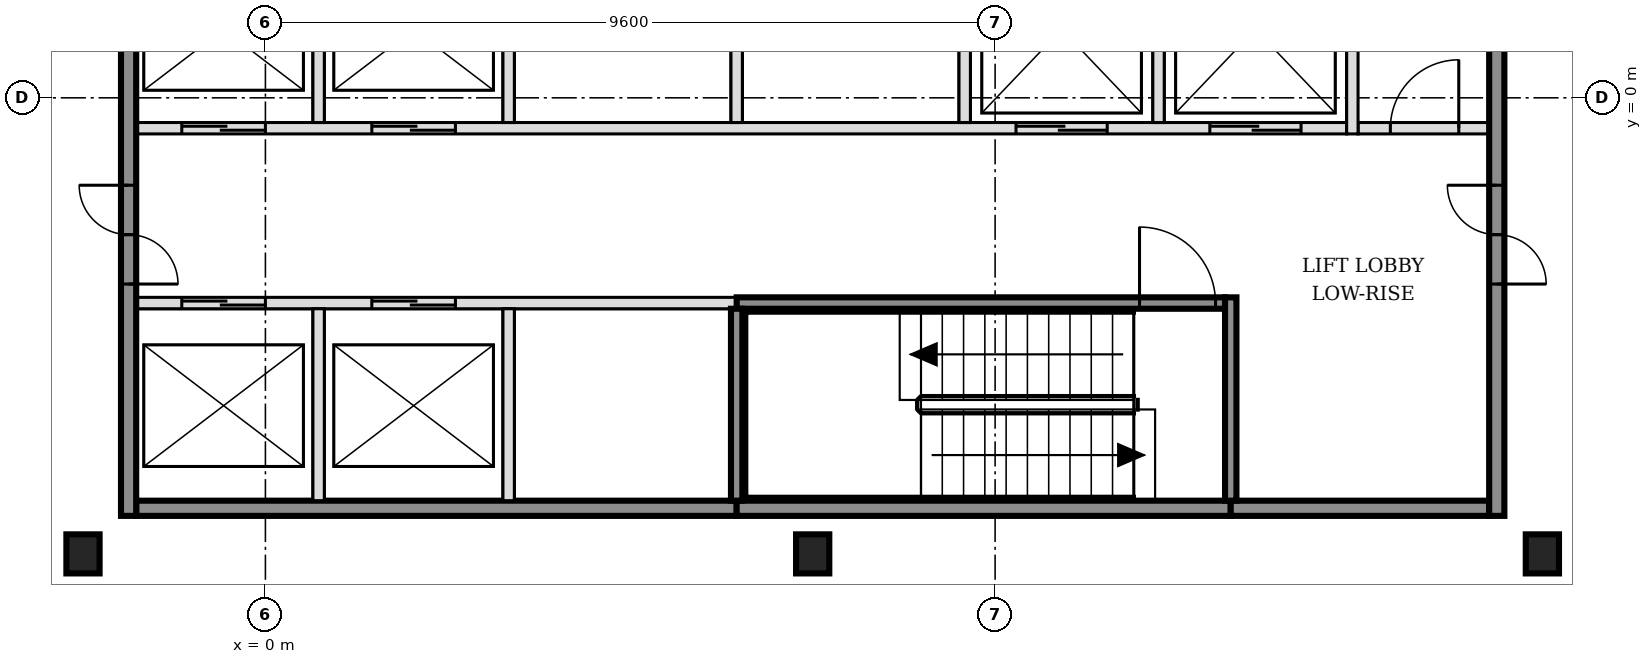
"""IFC4 building model, lengths in metres.
Left out: names, types, materials, properties, quantities, classifications, styles, units other than length and angle.
Written with IfcOpenShell. Run it as: python <this file> out.ifc"""

import sys

from ifc_helpers import new_model, si_unit, direction, frame, frame_2d, origin, origin_2d, place, context, subcontext, project, spatial, rectangle, i_section, extrude, element, fill, save


model = new_model("IFC4")
c1 = context("Model", 3, precision=1e-05, world=origin(), true_north=direction((0.0, 1.0)))
c2 = subcontext(c1, "Body", "Model", "MODEL_VIEW")
j1 = project(units=[si_unit("LENGTHUNIT", "METRE"), si_unit("PLANEANGLEUNIT", "RADIAN")], contexts=[c1])
p1 = place(None, origin())
s1 = spatial("IfcSite", under=j1, at=p1, CompositionType="ELEMENT")
p2 = place(p1, origin())
s2 = spatial("IfcBuilding", under=s1, at=p2, CompositionType="ELEMENT")
p3 = place(p2, frame((0.0, 0.0, 72.6)))
s3 = spatial("IfcBuildingStorey", under=s2, at=p3, CompositionType="ELEMENT", Elevation=72.6)
for number, where, z_axis, x_axis in (
    (1, (-2.4, -6.0, -0.15), (0.0, 0.0, 1.0), (1.0, 0.0, 0.0)),
    (2, (7.2, -6.0, -0.15), (0.0, 0.0, 1.0), (1.0, 0.0, 0.0)),
    (3, (16.8, -6.0, -0.15), (0.0, 0.0, 1.0), (1.0, 0.0, 0.0)),
):
    element("IfcColumn", number, at=place(p3, frame(where, z_axis=z_axis, x_axis=x_axis)), inside=s3, PredefinedType="COLUMN", context=c2, shape_type="SweptSolid", body=[
        extrude(i_section(OverallWidth=0.437, OverallDepth=0.514, WebThickness=0.061, FlangeThickness=0.097, FilletRadius=0.015, at=origin_2d()), origin(), (0.0, 0.0, 1.0), 3.6),
    ])
p4 = place(p3, frame((-1.7, -5.4, 0.0), z_axis=(0.0, 0.0, 1.0), x_axis=(1.0, 0.0, 0.0)))
e4 = element("IfcWall", 4, at=p4, inside=s3, PredefinedType="SOLIDWALL", context=c2, shape_type="SweptSolid", body=[
    extrude(rectangle(XDim=7.9, YDim=0.2, at=frame_2d((3.95, 0.0))), origin(), (0.0, 0.0, 1.0), 3.45),
])
p5 = place(p3, frame((6.2, -5.4, 0.0), z_axis=(0.0, 0.0, 1.0), x_axis=(1.0, 0.0, 0.0)))
e5 = element("IfcWall", 5, at=p5, inside=s3, PredefinedType="SOLIDWALL", context=c2, shape_type="SweptSolid", body=[
    extrude(rectangle(XDim=6.5, YDim=0.2, at=frame_2d((3.25, 0.0))), origin(), (0.0, 0.0, 1.0), 3.45),
])
p6 = place(p3, frame((12.7, -5.4, 0.0), z_axis=(0.0, 0.0, 1.0), x_axis=(1.0, 0.0, 0.0)))
e6 = element("IfcWall", 6, at=p6, inside=s3, PredefinedType="SOLIDWALL", context=c2, shape_type="SweptSolid", body=[
    extrude(rectangle(XDim=3.4, YDim=0.2, at=frame_2d((1.7, 0.0))), origin(), (0.0, 0.0, 1.0), 3.45),
])
p7 = place(p3, frame((-1.7, -2.7, 0.0), z_axis=(0.0, 0.0, 1.0), x_axis=(1.0, 0.0, 0.0)))
e7 = element("IfcWall", 7, at=p7, inside=s3, PredefinedType="SOLIDWALL", context=c2, shape_type="SweptSolid", body=[
    extrude(rectangle(XDim=7.9, YDim=0.15, at=frame_2d((3.95, 0.0))), origin(), (0.0, 0.0, 1.0), 3.45),
])
p8 = place(p7, frame((0.6, 0.0, 0.0)))
e8 = element("IfcOpeningElement", 8, at=p8, cuts=e7, PredefinedType="OPENING", context=c2, shape_type="SweptSolid", body=[
    extrude(rectangle(XDim=1.1, YDim=2.1, at=frame_2d((0.55, 1.05))), frame((0.0, 0.085, 0.0), z_axis=(0.0, -1.0, 0.0), x_axis=(1.0, 0.0, 0.0)), (0.0, 0.0, 1.0), 0.17),
])
p9 = place(p7, frame((3.1, 0.0, 0.0)))
e9 = element("IfcOpeningElement", 9, at=p9, cuts=e7, PredefinedType="OPENING", context=c2, shape_type="SweptSolid", body=[
    extrude(rectangle(XDim=1.1, YDim=2.1, at=frame_2d((0.55, 1.05))), frame((0.0, 0.085, 0.0), z_axis=(0.0, -1.0, 0.0), x_axis=(1.0, 0.0, 0.0)), (0.0, 0.0, 1.0), 0.17),
])
p10 = place(p3, frame((6.2, -2.7, 0.0), z_axis=(0.0, 0.0, 1.0), x_axis=(1.0, 0.0, 0.0)))
e10 = element("IfcWall", 10, at=p10, inside=s3, PredefinedType="SOLIDWALL", context=c2, shape_type="SweptSolid", body=[
    extrude(rectangle(XDim=6.425, YDim=0.15, at=frame_2d((3.212, 0.0))), origin(), (0.0, 0.0, 1.0), 3.45),
])
p11 = place(p10, frame((5.3, 0.0, 0.0)))
e11 = element("IfcOpeningElement", 11, at=p11, cuts=e10, PredefinedType="OPENING", context=c2, shape_type="SweptSolid", body=[
    extrude(rectangle(XDim=1.0, YDim=2.1, at=frame_2d((0.5, 1.05))), frame((0.0, 0.085, 0.0), z_axis=(0.0, -1.0, 0.0), x_axis=(1.0, 0.0, 0.0)), (0.0, 0.0, 1.0), 0.17),
])
p12 = place(p3, frame((-1.7, -0.4, 0.0), z_axis=(0.0, 0.0, 1.0), x_axis=(1.0, 0.0, 0.0)))
e12 = element("IfcWall", 12, at=p12, inside=s3, PredefinedType="SOLIDWALL", context=c2, shape_type="SweptSolid", body=[
    extrude(rectangle(XDim=15.925, YDim=0.15, at=frame_2d((7.962, 0.0))), origin(), (0.0, 0.0, 1.0), 3.45),
])
p13 = place(p12, frame((0.6, 0.0, 0.0)))
e13 = element("IfcOpeningElement", 13, at=p13, cuts=e12, PredefinedType="OPENING", context=c2, shape_type="SweptSolid", body=[
    extrude(rectangle(XDim=1.1, YDim=2.1, at=frame_2d((0.55, 1.05))), frame((0.0, 0.085, 0.0), z_axis=(0.0, -1.0, 0.0), x_axis=(1.0, 0.0, 0.0)), (0.0, 0.0, 1.0), 0.17),
])
p14 = place(p12, frame((3.1, 0.0, 0.0)))
e14 = element("IfcOpeningElement", 14, at=p14, cuts=e12, PredefinedType="OPENING", context=c2, shape_type="SweptSolid", body=[
    extrude(rectangle(XDim=1.1, YDim=2.1, at=frame_2d((0.55, 1.05))), frame((0.0, 0.085, 0.0), z_axis=(0.0, -1.0, 0.0), x_axis=(1.0, 0.0, 0.0)), (0.0, 0.0, 1.0), 0.17),
])
p15 = place(p12, frame((11.575, 0.0, 0.0)))
e15 = element("IfcOpeningElement", 15, at=p15, cuts=e12, PredefinedType="OPENING", context=c2, shape_type="SweptSolid", body=[
    extrude(rectangle(XDim=1.2, YDim=2.1, at=frame_2d((0.6, 1.05))), frame((0.0, 0.085, 0.0), z_axis=(0.0, -1.0, 0.0), x_axis=(1.0, 0.0, 0.0)), (0.0, 0.0, 1.0), 0.17),
])
p16 = place(p12, frame((14.125, 0.0, 0.0)))
e16 = element("IfcOpeningElement", 16, at=p16, cuts=e12, PredefinedType="OPENING", context=c2, shape_type="SweptSolid", body=[
    extrude(rectangle(XDim=1.2, YDim=2.1, at=frame_2d((0.6, 1.05))), frame((0.0, 0.085, 0.0), z_axis=(0.0, -1.0, 0.0), x_axis=(1.0, 0.0, 0.0)), (0.0, 0.0, 1.0), 0.17),
])
p17 = place(p3, frame((14.375, -0.4, 0.0), z_axis=(0.0, 0.0, 1.0), x_axis=(1.0, 0.0, 0.0)))
e17 = element("IfcWall", 17, at=p17, inside=s3, PredefinedType="PARTITIONING", context=c2, shape_type="SweptSolid", body=[
    extrude(rectangle(XDim=1.725, YDim=0.15, at=frame_2d((0.863, 0.0))), origin(), (0.0, 0.0, 1.0), 3.45),
])
p18 = place(p17, frame((0.425, 0.0, 0.0)))
e18 = element("IfcOpeningElement", 18, at=p18, cuts=e17, PredefinedType="OPENING", context=c2, shape_type="SweptSolid", body=[
    extrude(rectangle(XDim=0.9, YDim=2.1, at=frame_2d((0.45, 1.05))), frame((0.0, 0.085, 0.0), z_axis=(0.0, -1.0, 0.0), x_axis=(1.0, 0.0, 0.0)), (0.0, 0.0, 1.0), 0.17),
])
p19 = place(p3, frame((-1.8, -5.5, 0.0), z_axis=(0.0, 0.0, 1.0), x_axis=(0.0, 1.0, 0.0)))
e19 = element("IfcWall", 19, at=p19, inside=s3, PredefinedType="SOLIDWALL", context=c2, shape_type="SweptSolid", body=[
    extrude(rectangle(XDim=15.8, YDim=0.2, at=frame_2d((7.9, 0.0))), origin(), (0.0, 0.0, 1.0), 3.45),
])
p20 = place(p19, frame((3.05, 0.0, 0.0)))
e20 = element("IfcOpeningElement", 20, at=p20, cuts=e19, PredefinedType="OPENING", context=c2, shape_type="SweptSolid", body=[
    extrude(rectangle(XDim=1.3, YDim=2.1, at=frame_2d((0.65, 1.05))), frame((0.0, 0.11, 0.0), z_axis=(0.0, -1.0, 0.0), x_axis=(1.0, 0.0, 0.0)), (0.0, 0.0, 1.0), 0.22),
])
p21 = place(p19, frame((11.45, 0.0, 0.0)))
e21 = element("IfcOpeningElement", 21, at=p21, cuts=e19, PredefinedType="OPENING", context=c2, shape_type="SweptSolid", body=[
    extrude(rectangle(XDim=1.3, YDim=2.1, at=frame_2d((0.65, 1.05))), frame((0.0, 0.11, 0.0), z_axis=(0.0, -1.0, 0.0), x_axis=(1.0, 0.0, 0.0)), (0.0, 0.0, 1.0), 0.22),
])
p22 = place(p3, frame((0.7, -5.3, 0.0), z_axis=(0.0, 0.0, 1.0), x_axis=(0.0, 1.0, 0.0)))
e22 = element("IfcWall", 22, at=p22, inside=s3, PredefinedType="SOLIDWALL", context=c2, shape_type="SweptSolid", body=[
    extrude(rectangle(XDim=2.525, YDim=0.15, at=frame_2d((1.263, 0.0))), origin(), (0.0, 0.0, 1.0), 3.45),
])
p23 = place(p3, frame((0.7, -0.325, 0.0), z_axis=(0.0, 0.0, 1.0), x_axis=(0.0, 1.0, 0.0)))
e23 = element("IfcWall", 23, at=p23, inside=s3, PredefinedType="SOLIDWALL", context=c2, shape_type="SweptSolid", body=[
    extrude(rectangle(XDim=2.45, YDim=0.15, at=frame_2d((1.225, 0.0))), origin(), (0.0, 0.0, 1.0), 3.45),
])
p24 = place(p3, frame((3.2, -5.3, 0.0), z_axis=(0.0, 0.0, 1.0), x_axis=(0.0, 1.0, 0.0)))
e24 = element("IfcWall", 24, at=p24, inside=s3, PredefinedType="SOLIDWALL", context=c2, shape_type="SweptSolid", body=[
    extrude(rectangle(XDim=2.525, YDim=0.15, at=frame_2d((1.263, 0.0))), origin(), (0.0, 0.0, 1.0), 3.45),
])
p25 = place(p3, frame((3.2, -0.325, 0.0), z_axis=(0.0, 0.0, 1.0), x_axis=(0.0, 1.0, 0.0)))
e25 = element("IfcWall", 25, at=p25, inside=s3, PredefinedType="SOLIDWALL", context=c2, shape_type="SweptSolid", body=[
    extrude(rectangle(XDim=2.45, YDim=0.15, at=frame_2d((1.225, 0.0))), origin(), (0.0, 0.0, 1.0), 3.45),
])
p26 = place(p3, frame((6.2, -5.3, 0.0), z_axis=(0.0, 0.0, 1.0), x_axis=(0.0, 1.0, 0.0)))
e26 = element("IfcWall", 26, at=p26, inside=s3, PredefinedType="SOLIDWALL", context=c2, shape_type="SweptSolid", body=[
    extrude(rectangle(XDim=2.525, YDim=0.15, at=frame_2d((1.263, 0.0))), origin(), (0.0, 0.0, 1.0), 3.45),
])
for number, where, z_axis, x_axis in (
    (27, (6.2, -0.325, 0.0), (0.0, 0.0, 1.0), (0.0, 1.0, 0.0)),
    (28, (9.2, -0.325, 0.0), (0.0, 0.0, 1.0), (0.0, 1.0, 0.0)),
    (29, (11.75, -0.325, 0.0), (0.0, 0.0, 1.0), (0.0, 1.0, 0.0)),
):
    element("IfcWall", number, at=place(p3, frame(where, z_axis=z_axis, x_axis=x_axis)), inside=s3, PredefinedType="SOLIDWALL", context=c2, shape_type="SweptSolid", body=[
        extrude(rectangle(XDim=2.45, YDim=0.15, at=frame_2d((1.225, 0.0))), origin(), (0.0, 0.0, 1.0), 3.45),
    ])
p27 = place(p3, frame((12.7, -5.3, 0.0), z_axis=(0.0, 0.0, 1.0), x_axis=(0.0, 1.0, 0.0)))
e30 = element("IfcWall", 30, at=p27, inside=s3, PredefinedType="SOLIDWALL", context=c2, shape_type="SweptSolid", body=[
    extrude(rectangle(XDim=2.675, YDim=0.15, at=frame_2d((1.337, 0.0))), origin(), (0.0, 0.0, 1.0), 3.45),
])
p28 = place(p3, frame((14.3, -0.475, 0.0), z_axis=(0.0, 0.0, 1.0), x_axis=(0.0, 1.0, 0.0)))
e31 = element("IfcWall", 31, at=p28, inside=s3, PredefinedType="SOLIDWALL", context=c2, shape_type="SweptSolid", body=[
    extrude(rectangle(XDim=2.75, YDim=0.15, at=frame_2d((1.375, 0.0))), origin(), (0.0, 0.0, 1.0), 3.45),
])
p29 = place(p3, frame((16.2, -5.5, 0.0), z_axis=(0.0, 0.0, 1.0), x_axis=(0.0, 1.0, 0.0)))
e32 = element("IfcWall", 32, at=p29, inside=s3, PredefinedType="SOLIDWALL", context=c2, shape_type="SweptSolid", body=[
    extrude(rectangle(XDim=15.8, YDim=0.2, at=frame_2d((7.9, 0.0))), origin(), (0.0, 0.0, 1.0), 3.45),
])
p30 = place(p29, frame((3.05, 0.0, 0.0)))
e33 = element("IfcOpeningElement", 33, at=p30, cuts=e32, PredefinedType="OPENING", context=c2, shape_type="SweptSolid", body=[
    extrude(rectangle(XDim=1.3, YDim=2.1, at=frame_2d((0.65, 1.05))), frame((0.0, 0.11, 0.0), z_axis=(0.0, -1.0, 0.0), x_axis=(1.0, 0.0, 0.0)), (0.0, 0.0, 1.0), 0.22),
])
p31 = place(p29, frame((11.45, 0.0, 0.0)))
e34 = element("IfcOpeningElement", 34, at=p31, cuts=e32, PredefinedType="OPENING", context=c2, shape_type="SweptSolid", body=[
    extrude(rectangle(XDim=1.3, YDim=2.1, at=frame_2d((0.65, 1.05))), frame((0.0, 0.11, 0.0), z_axis=(0.0, -1.0, 0.0), x_axis=(1.0, 0.0, 0.0)), (0.0, 0.0, 1.0), 0.22),
])
p32 = place(p8, origin())
e35 = element("IfcDoor", 35, at=p32, inside=s3, OperationType="DOUBLE_DOOR_SLIDING", PredefinedType="DOOR", context=c2, shape_type="SweptSolid", body=[
    extrude(rectangle(XDim=1.1, YDim=2.1, at=frame_2d((0.55, 1.05))), frame((0.0, 0.025, 0.0), z_axis=(0.0, -1.0, 0.0), x_axis=(1.0, 0.0, 0.0)), (0.0, 0.0, 1.0), 0.05),
])
fill(e8, e35)
p33 = place(p9, origin())
e36 = element("IfcDoor", 36, at=p33, inside=s3, OperationType="DOUBLE_DOOR_SLIDING", PredefinedType="DOOR", context=c2, shape_type="SweptSolid", body=[
    extrude(rectangle(XDim=1.1, YDim=2.1, at=frame_2d((0.55, 1.05))), frame((0.0, 0.025, 0.0), z_axis=(0.0, -1.0, 0.0), x_axis=(1.0, 0.0, 0.0)), (0.0, 0.0, 1.0), 0.05),
])
fill(e9, e36)
p34 = place(p13, origin())
e37 = element("IfcDoor", 37, at=p34, inside=s3, OperationType="DOUBLE_DOOR_SLIDING", PredefinedType="DOOR", context=c2, shape_type="SweptSolid", body=[
    extrude(rectangle(XDim=1.1, YDim=2.1, at=frame_2d((0.55, 1.05))), frame((0.0, 0.025, 0.0), z_axis=(0.0, -1.0, 0.0), x_axis=(1.0, 0.0, 0.0)), (0.0, 0.0, 1.0), 0.05),
])
fill(e13, e37)
p35 = place(p14, origin())
e38 = element("IfcDoor", 38, at=p35, inside=s3, OperationType="DOUBLE_DOOR_SLIDING", PredefinedType="DOOR", context=c2, shape_type="SweptSolid", body=[
    extrude(rectangle(XDim=1.1, YDim=2.1, at=frame_2d((0.55, 1.05))), frame((0.0, 0.025, 0.0), z_axis=(0.0, -1.0, 0.0), x_axis=(1.0, 0.0, 0.0)), (0.0, 0.0, 1.0), 0.05),
])
fill(e14, e38)
p36 = place(p15, origin())
e39 = element("IfcDoor", 39, at=p36, inside=s3, OperationType="DOUBLE_DOOR_SLIDING", PredefinedType="DOOR", context=c2, shape_type="SweptSolid", body=[
    extrude(rectangle(XDim=1.2, YDim=2.1, at=frame_2d((0.6, 1.05))), frame((0.0, 0.025, 0.0), z_axis=(0.0, -1.0, 0.0), x_axis=(1.0, 0.0, 0.0)), (0.0, 0.0, 1.0), 0.05),
])
fill(e15, e39)
p37 = place(p16, origin())
e40 = element("IfcDoor", 40, at=p37, inside=s3, OperationType="DOUBLE_DOOR_SLIDING", PredefinedType="DOOR", context=c2, shape_type="SweptSolid", body=[
    extrude(rectangle(XDim=1.2, YDim=2.1, at=frame_2d((0.6, 1.05))), frame((0.0, 0.025, 0.0), z_axis=(0.0, -1.0, 0.0), x_axis=(1.0, 0.0, 0.0)), (0.0, 0.0, 1.0), 0.05),
])
fill(e16, e40)
p38 = place(p11, origin())
e41 = element("IfcDoor", 41, at=p38, inside=s3, OperationType="SINGLE_SWING_LEFT", PredefinedType="DOOR", context=c2, shape_type="SweptSolid", body=[
    extrude(rectangle(XDim=1.0, YDim=2.1, at=frame_2d((0.5, 1.05))), frame((0.0, 0.025, 0.0), z_axis=(0.0, -1.0, 0.0), x_axis=(1.0, 0.0, 0.0)), (0.0, 0.0, 1.0), 0.05),
])
fill(e11, e41)
p39 = place(p20, origin())
e42 = element("IfcDoor", 42, at=p39, inside=s3, OperationType="DOUBLE_DOOR_SINGLE_SWING", PredefinedType="DOOR", context=c2, shape_type="SweptSolid", body=[
    extrude(rectangle(XDim=1.3, YDim=2.1, at=frame_2d((0.65, 1.05))), frame((0.0, 0.025, 0.0), z_axis=(0.0, -1.0, 0.0), x_axis=(1.0, 0.0, 0.0)), (0.0, 0.0, 1.0), 0.05),
])
fill(e20, e42)
p40 = place(p30, origin())
e43 = element("IfcDoor", 43, at=p40, inside=s3, OperationType="DOUBLE_DOOR_SINGLE_SWING", PredefinedType="DOOR", context=c2, shape_type="SweptSolid", body=[
    extrude(rectangle(XDim=1.3, YDim=2.1, at=frame_2d((0.65, 1.05))), frame((0.0, 0.025, 0.0), z_axis=(0.0, -1.0, 0.0), x_axis=(1.0, 0.0, 0.0)), (0.0, 0.0, 1.0), 0.05),
])
fill(e33, e43)
p41 = place(p18, origin())
e44 = element("IfcDoor", 44, at=p41, inside=s3, OperationType="SINGLE_SWING_RIGHT", PredefinedType="DOOR", context=c2, shape_type="SweptSolid", body=[
    extrude(rectangle(XDim=0.9, YDim=2.1, at=frame_2d((0.45, 1.05))), frame((0.0, 0.025, 0.0), z_axis=(0.0, -1.0, 0.0), x_axis=(1.0, 0.0, 0.0)), (0.0, 0.0, 1.0), 0.05),
])
fill(e18, e44)
save(model, sys.argv[1])
